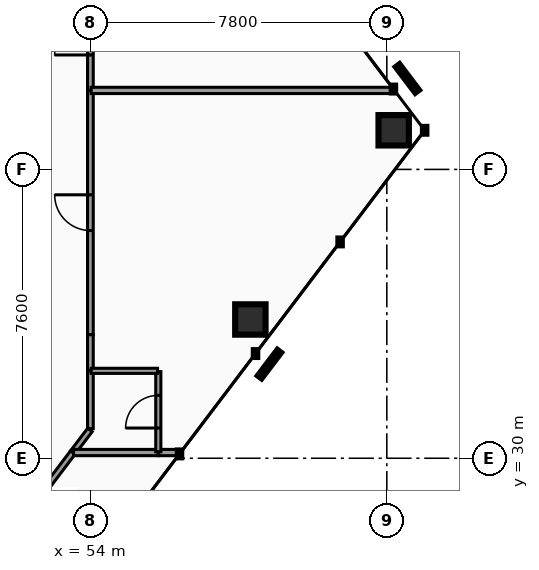
"""IFC4 building model, lengths in metres.
Left out: names, types, materials, properties, quantities, classifications, styles, units other than length and angle.
Written with IfcOpenShell. Run it as: python <this file> out.ifc"""

import sys

from ifc_helpers import new_model, si_unit, direction, frame, frame_2d, origin, origin_2d, place, context, subcontext, project, spatial, rectangle, hollow_rectangle, extrude, element, fill, save


model = new_model("IFC4")
c1 = context("Model", 3, precision=1e-05, world=origin(), true_north=direction((0.0, 1.0)))
c2 = subcontext(c1, "Body", "Model", "MODEL_VIEW")
j1 = project(units=[si_unit("LENGTHUNIT", "METRE"), si_unit("PLANEANGLEUNIT", "RADIAN")], contexts=[c1])
p1 = place(None, origin())
s1 = spatial("IfcSite", under=j1, at=p1, CompositionType="ELEMENT")
p2 = place(p1, origin())
s2 = spatial("IfcBuilding", under=s1, at=p2, CompositionType="ELEMENT")
p3 = place(p2, frame((0.0, 0.0, 123.42)))
s3 = spatial("IfcBuildingStorey", under=s2, at=p3, CompositionType="ELEMENT", Elevation=123.42)
for number, where, z_axis, x_axis in (
    (1, (58.209, 33.651, 0.0), (0.0, 0.0, 1.0), (1.0, 0.0, 0.0)),
    (2, (61.981, 38.629, 0.0), (0.0, 0.0, 1.0), (1.0, 0.0, 0.0)),
):
    element("IfcColumn", number, at=place(p3, frame(where, z_axis=z_axis, x_axis=x_axis)), inside=s3, PredefinedType="COLUMN", context=c2, shape_type="SweptSolid", body=[
        extrude(hollow_rectangle(XDim=0.8, YDim=0.8, WallThickness=0.04, at=origin_2d()), origin(), (0.0, 0.0, 1.0), 3.5),
    ])
p4 = place(p3, frame((51.662, 27.675, 0.0), z_axis=(0.0, 0.0, 1.0), x_axis=(0.603831940294, 0.797111653334, 0.0)))
e3 = element("IfcWall", 3, at=p4, inside=s3, PredefinedType="PARTITIONING", context=c2, shape_type="SweptSolid", body=[
    extrude(rectangle(XDim=3.104, YDim=0.15, at=frame_2d((1.552, 0.0))), origin(), (0.0, 0.0, 1.0), 2.457),
])
p5 = place(p3, frame((54.0, 33.25, 0.0), z_axis=(0.0, 0.0, 1.0), x_axis=(0.0, 1.0, 0.0)))
e4 = element("IfcWall", 4, at=p5, inside=s3, PredefinedType="PARTITIONING", context=c2, shape_type="SweptSolid", body=[
    extrude(rectangle(XDim=6.423, YDim=0.15, at=frame_2d((3.212, 0.0))), origin(), (0.0, 0.0, 1.0), 2.457),
])
p6 = place(p5, frame((2.742, 0.0, 0.0)))
e5 = element("IfcOpeningElement", 5, at=p6, cuts=e4, PredefinedType="OPENING", context=c2, shape_type="SweptSolid", body=[
    extrude(rectangle(XDim=0.94, YDim=2.05, at=frame_2d((0.47, 1.025))), frame((0.0, 0.085, 0.0), z_axis=(0.0, -1.0, 0.0), x_axis=(1.0, 0.0, 0.0)), (0.0, 0.0, 1.0), 0.17),
])
p7 = place(p3, frame((54.0, 32.305, 0.0), z_axis=(0.0, 0.0, 1.0), x_axis=(0.0, 1.0, 0.0)))
e6 = element("IfcWall", 6, at=p7, inside=s3, PredefinedType="PARTITIONING", context=c2, shape_type="SweptSolid", body=[
    extrude(rectangle(XDim=0.945, YDim=0.15, at=frame_2d((0.473, 0.0))), origin(), (0.0, 0.0, 1.0), 2.457),
])
p8 = place(p3, frame((54.0, 30.781, 0.0), z_axis=(0.0, 0.0, 1.0), x_axis=(0.0, 1.0, 0.0)))
e7 = element("IfcWall", 7, at=p8, inside=s3, PredefinedType="PARTITIONING", context=c2, shape_type="SweptSolid", body=[
    extrude(rectangle(XDim=1.514, YDim=0.15, at=frame_2d((0.757, 0.0))), origin(), (0.0, 0.0, 1.0), 2.457),
])
p9 = place(p3, frame((53.54, 30.154, 0.0), z_axis=(0.0, 0.0, 1.0), x_axis=(0.603680225987, 0.797226557982, 0.0)))
e8 = element("IfcWall", 8, at=p9, inside=s3, PredefinedType="PARTITIONING", context=c2, shape_type="SweptSolid", body=[
    extrude(rectangle(XDim=0.742, YDim=0.15, at=frame_2d((0.371, 0.0))), origin(), (0.0, 0.0, 1.0), 2.457),
])
p10 = place(p3, frame((54.0, 39.683, 0.0), z_axis=(0.0, 0.0, 1.0), x_axis=(0.0, 1.0, 0.0)))
e9 = element("IfcWall", 9, at=p10, inside=s3, PredefinedType="PARTITIONING", context=c2, shape_type="SweptSolid", body=[
    extrude(rectangle(XDim=2.797, YDim=0.15, at=frame_2d((1.398, 0.0))), origin(), (0.0, 0.0, 1.0), 2.457),
])
p11 = place(p10, frame((0.928, 0.0, 0.0)))
e10 = element("IfcOpeningElement", 10, at=p11, cuts=e9, PredefinedType="OPENING", context=c2, shape_type="SweptSolid", body=[
    extrude(rectangle(XDim=0.94, YDim=2.05, at=frame_2d((0.47, 1.025))), frame((0.0, 0.085, 0.0), z_axis=(0.0, -1.0, 0.0), x_axis=(1.0, 0.0, 0.0)), (0.0, 0.0, 1.0), 0.17),
])
p12 = place(p3, frame((55.792, 30.15, 0.0), z_axis=(0.0, 0.0, 1.0), x_axis=(1.0, 0.0, 0.0)))
e11 = element("IfcWall", 11, at=p12, inside=s3, PredefinedType="PARTITIONING", context=c2, shape_type="SweptSolid", body=[
    extrude(rectangle(XDim=0.565, YDim=0.165, at=frame_2d((0.283, 0.0))), origin(), (0.0, 0.0, 1.0), 2.457),
])
p13 = place(p3, frame((53.557, 30.15, 0.0), z_axis=(0.0, 0.0, 1.0), x_axis=(1.0, 0.0, 0.0)))
e12 = element("IfcWall", 12, at=p13, inside=s3, PredefinedType="PARTITIONING", context=c2, shape_type="SweptSolid", body=[
    extrude(rectangle(XDim=2.225, YDim=0.165, at=frame_2d((1.113, 0.0))), origin(), (0.0, 0.0, 1.0), 2.457),
])
p14 = place(p3, frame((55.787, 30.17, 0.0), z_axis=(0.0, 0.0, 1.0), x_axis=(0.0, 1.0, 0.0)))
e13 = element("IfcWall", 13, at=p14, inside=s3, PredefinedType="PARTITIONING", context=c2, shape_type="SweptSolid", body=[
    extrude(rectangle(XDim=2.11, YDim=0.135, at=frame_2d((1.055, 0.0))), origin(), (0.0, 0.0, 1.0), 2.457),
])
p15 = place(p14, frame((0.625, 0.0, 0.0)))
e14 = element("IfcOpeningElement", 14, at=p15, cuts=e13, PredefinedType="OPENING", context=c2, shape_type="SweptSolid", body=[
    extrude(rectangle(XDim=0.86, YDim=2.05, at=frame_2d((0.43, 1.025))), frame((0.0, 0.077, 0.0), z_axis=(0.0, -1.0, 0.0), x_axis=(1.0, 0.0, 0.0)), (0.0, 0.0, 1.0), 0.155),
])
p16 = place(p3, frame((54.02, 32.3, 0.0), z_axis=(0.0, 0.0, 1.0), x_axis=(1.0, 0.0, 0.0)))
e15 = element("IfcWall", 15, at=p16, inside=s3, PredefinedType="PARTITIONING", context=c2, shape_type="SweptSolid", body=[
    extrude(rectangle(XDim=1.747, YDim=0.135, at=frame_2d((0.874, 0.0))), origin(), (0.0, 0.0, 1.0), 2.457),
])
p17 = place(p3, frame((54.02, 39.678, 0.0), z_axis=(0.0, 0.0, 1.0), x_axis=(1.0, 0.0, 0.0)))
e16 = element("IfcWall", 16, at=p17, inside=s3, PredefinedType="PARTITIONING", context=c2, shape_type="SweptSolid", body=[
    extrude(rectangle(XDim=7.967, YDim=0.165, at=frame_2d((3.983, 0.0))), origin(), (0.0, 0.0, 1.0), 2.457),
])
p18 = place(p6, origin())
e17 = element("IfcDoor", 17, at=p18, inside=s3, OperationType="SINGLE_SWING_RIGHT", PredefinedType="DOOR", context=c2, shape_type="SweptSolid", body=[
    extrude(rectangle(XDim=0.94, YDim=2.05, at=frame_2d((0.47, 1.025))), frame((0.0, 0.025, 0.0), z_axis=(0.0, -1.0, 0.0), x_axis=(1.0, 0.0, 0.0)), (0.0, 0.0, 1.0), 0.05),
])
fill(e5, e17)
p19 = place(p11, origin())
e18 = element("IfcDoor", 18, at=p19, inside=s3, OperationType="SINGLE_SWING_LEFT", PredefinedType="DOOR", context=c2, shape_type="SweptSolid", body=[
    extrude(rectangle(XDim=0.94, YDim=2.05, at=frame_2d((0.47, 1.025))), frame((0.0, 0.025, 0.0), z_axis=(0.0, -1.0, 0.0), x_axis=(1.0, 0.0, 0.0)), (0.0, 0.0, 1.0), 0.05),
])
fill(e10, e18)
p20 = place(p15, origin())
e19 = element("IfcDoor", 19, at=p20, inside=s3, OperationType="SINGLE_SWING_LEFT", PredefinedType="DOOR", context=c2, shape_type="SweptSolid", body=[
    extrude(rectangle(XDim=0.86, YDim=2.05, at=frame_2d((0.43, 1.025))), frame((0.0, 0.025, 0.0), z_axis=(0.0, -1.0, 0.0), x_axis=(1.0, 0.0, 0.0)), (0.0, 0.0, 1.0), 0.05),
])
fill(e14, e19)
save(model, sys.argv[1])
